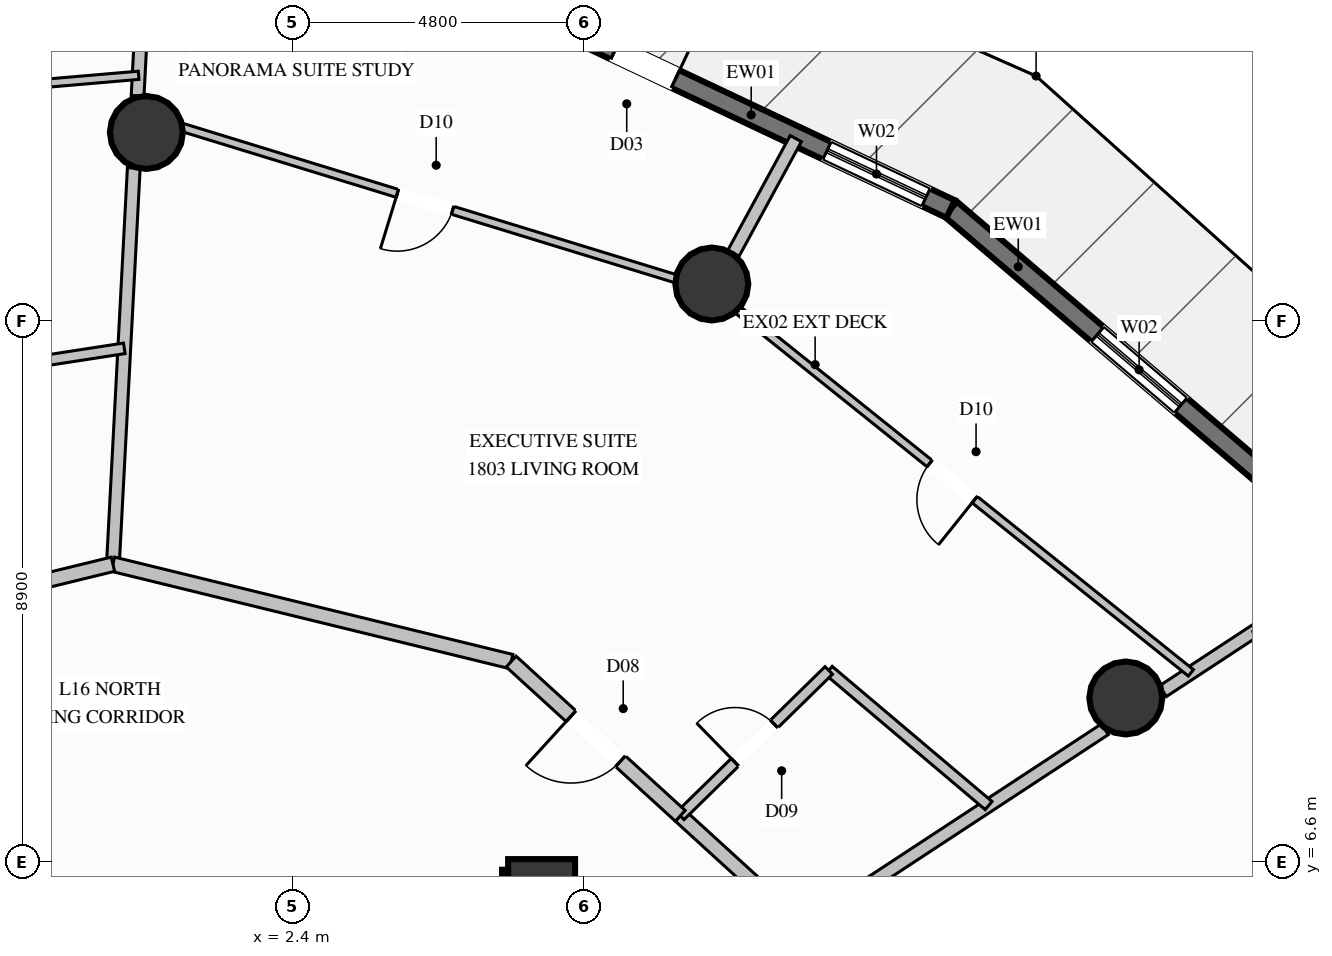
"""IFC4 building model, lengths in metres.
Left out: names, types, materials, properties, quantities, classifications, styles, units other than length and angle.
Written with IfcOpenShell. Run it as: python <this file> out.ifc"""

import sys

from ifc_helpers import new_model, si_unit, direction, frame, frame_2d, origin, origin_2d, place, context, subcontext, project, spatial, rectangle, circle, extrude, element, fill, save


model = new_model("IFC4")
c1 = context("Model", 3, precision=1e-05, world=origin(), true_north=direction((0.0, 1.0)))
c2 = subcontext(c1, "Body", "Model", "MODEL_VIEW")
j1 = project(units=[si_unit("LENGTHUNIT", "METRE"), si_unit("PLANEANGLEUNIT", "RADIAN")], contexts=[c1])
p1 = place(None, origin())
s1 = spatial("IfcSite", under=j1, at=p1, CompositionType="ELEMENT")
p2 = place(p1, origin())
s2 = spatial("IfcBuilding", under=s1, at=p2, CompositionType="ELEMENT")
p3 = place(p2, frame((0.0, 0.0, 68.0)))
s3 = spatial("IfcBuildingStorey", under=s2, at=p3, CompositionType="ELEMENT", Elevation=68.0)
p4 = place(p3, frame((6.5, 6.1, 0.0), z_axis=(0.0, 0.0, 1.0), x_axis=(1.0, 0.0, 0.0)))
e1 = element("IfcColumn", 1, at=p4, inside=s3, PredefinedType="COLUMN", context=c2, shape_type="SweptSolid", body=[
    extrude(rectangle(XDim=1.1, YDim=1.1, at=origin_2d()), origin(), (0.0, 0.0, 1.0), 3.6),
])
p5 = place(p3, frame((5.85, 6.1, 0.0), z_axis=(0.0, 0.0, 1.0), x_axis=(1.0, 0.0, 0.0)))
e2 = element("IfcWall", 2, at=p5, inside=s3, PredefinedType="SHEAR", context=c2, shape_type="SweptSolid", body=[
    extrude(rectangle(XDim=0.275, YDim=0.75, at=frame_2d((0.137, 0.0))), origin(), (0.0, 0.0, 1.0), 3.6),
])
p6 = place(p3, frame((6.5, 3.35, 0.0), z_axis=(0.0, 0.0, 1.0), x_axis=(0.0, 1.0, 0.0)))
e3 = element("IfcWall", 3, at=p6, inside=s3, PredefinedType="SHEAR", context=c2, shape_type="SweptSolid", body=[
    extrude(rectangle(XDim=3.125, YDim=0.75, at=frame_2d((1.562, 0.0))), origin(), (0.0, 0.0, 1.0), 3.6),
])
for number, where, z_axis, x_axis in (
    (4, (16.108, 9.3, 0.0), (0.0, 0.0, 1.0), (1.0, 0.0, 0.0)),
    (5, (9.3, 16.108, 0.0), (0.0, 0.0, 1.0), (1.0, 0.0, 0.0)),
    (6, (0.0, 18.6, 0.0), (0.0, 0.0, 1.0), (1.0, 0.0, 0.0)),
):
    element("IfcColumn", number, at=place(p3, frame(where, z_axis=z_axis, x_axis=x_axis)), inside=s3, PredefinedType="COLUMN", context=c2, shape_type="SweptSolid", body=[
        extrude(circle(Radius=0.6, at=origin_2d()), origin(), (0.0, 0.0, 1.0), 3.6),
    ])
p7 = place(p3, frame((13.227, 17.341, 0.0), z_axis=(0.0, 0.0, 1.0), x_axis=(0.76078130933, -0.649008319958, 0.0)))
e7 = element("IfcWall", 7, at=p7, inside=s3, PredefinedType="SOLIDWALL", context=c2, shape_type="SweptSolid", body=[
    extrude(rectangle(XDim=8.149, YDim=0.32, at=frame_2d((4.075, 0.0))), origin(), (0.0, 0.0, 1.0), 3.34),
])
p8 = place(p7, frame((3.175, 0.0, 0.35)))
e8 = element("IfcOpeningElement", 8, at=p8, cuts=e7, PredefinedType="OPENING", context=c2, shape_type="SweptSolid", body=[
    extrude(rectangle(XDim=1.8, YDim=2.6, at=frame_2d((0.9, 1.3))), frame((0.0, 0.17, 0.0), z_axis=(0.0, -1.0, 0.0), x_axis=(1.0, 0.0, 0.0)), (0.0, 0.0, 1.0), 0.34),
])
p9 = place(p3, frame((5.619, 20.933, 0.0), z_axis=(0.0, 0.0, 1.0), x_axis=(0.904280701051, -0.426938419105, 0.0)))
e9 = element("IfcWall", 9, at=p9, inside=s3, PredefinedType="SOLIDWALL", context=c2, shape_type="SweptSolid", body=[
    extrude(rectangle(XDim=8.414, YDim=0.32, at=frame_2d((4.207, 0.0))), origin(), (0.0, 0.0, 1.0), 3.34),
])
p10 = place(p9, frame((6.165, 0.0, 0.35)))
e10 = element("IfcOpeningElement", 10, at=p10, cuts=e9, PredefinedType="OPENING", context=c2, shape_type="SweptSolid", body=[
    extrude(rectangle(XDim=1.8, YDim=2.6, at=frame_2d((0.9, 1.3))), frame((0.0, 0.17, 0.0), z_axis=(0.0, -1.0, 0.0), x_axis=(1.0, 0.0, 0.0)), (0.0, 0.0, 1.0), 0.34),
])
p11 = place(p9, frame((2.308, 0.0, 0.0)))
e11 = element("IfcOpeningElement", 11, at=p11, cuts=e9, PredefinedType="OPENING", context=c2, shape_type="SweptSolid", body=[
    extrude(rectangle(XDim=1.1, YDim=2.2, at=frame_2d((0.55, 1.1))), frame((0.0, 0.17, 0.0), z_axis=(0.0, -1.0, 0.0), x_axis=(1.0, 0.0, 0.0)), (0.0, 0.0, 1.0), 0.34),
])
p12 = place(p3, frame((10.795, 5.525, 0.0), z_axis=(0.0, 0.0, 1.0), x_axis=(0.836067345727, 0.548626825273, 0.0)))
e12 = element("IfcWall", 12, at=p12, inside=s3, PredefinedType="PARTITIONING", context=c2, shape_type="SweptSolid", body=[
    extrude(rectangle(XDim=5.942, YDim=0.21, at=frame_2d((2.971, 0.0))), origin(), (0.0, 0.0, 1.0), 2.709),
])
p13 = place(p3, frame((16.718, 9.411, 0.0), z_axis=(0.0, 0.0, 1.0), x_axis=(0.836061262726, 0.548636095212, 0.0)))
e13 = element("IfcWall", 13, at=p13, inside=s3, PredefinedType="PARTITIONING", context=c2, shape_type="SweptSolid", body=[
    extrude(rectangle(XDim=3.669, YDim=0.21, at=frame_2d((1.835, 0.0))), origin(), (0.0, 0.0, 1.0), 3.34),
])
p14 = place(p3, frame((-0.55, 11.5, 0.0), z_axis=(0.0, 0.0, 1.0), x_axis=(0.052578474705, 0.998616795371, 0.0)))
e14 = element("IfcWall", 14, at=p14, inside=s3, PredefinedType="PARTITIONING", context=c2, shape_type="SweptSolid", body=[
    extrude(rectangle(XDim=6.524, YDim=0.21, at=frame_2d((3.262, 0.0))), origin(), (0.0, 0.0, 1.0), 3.34),
])
p15 = place(p3, frame((-0.144, 19.203, 0.0), z_axis=(0.0, 0.0, 1.0), x_axis=(0.052535465428, 0.998619058937, 0.0)))
e15 = element("IfcWall", 15, at=p15, inside=s3, PredefinedType="PARTITIONING", context=c2, shape_type="SweptSolid", body=[
    extrude(rectangle(XDim=2.742, YDim=0.21, at=frame_2d((1.371, 0.0))), origin(), (0.0, 0.0, 1.0), 3.34),
])
p16 = place(p3, frame((10.795, 5.525, 0.0), z_axis=(0.0, 0.0, 1.0), x_axis=(-0.738784017848, 0.673942263827, 0.0)))
e16 = element("IfcWall", 16, at=p16, inside=s3, PredefinedType="PARTITIONING", context=c2, shape_type="SweptSolid", body=[
    extrude(rectangle(XDim=2.726, YDim=0.24, at=frame_2d((1.363, 0.0))), origin(), (0.0, 0.0, 1.0), 3.34),
])
p17 = place(p3, frame((13.852, 7.531, 0.0), z_axis=(0.0, 0.0, 1.0), x_axis=(-0.76377891562, 0.645477937697, 0.0)))
e17 = element("IfcWall", 17, at=p17, inside=s3, PredefinedType="PLUMBINGWALL", context=c2, shape_type="SweptSolid", body=[
    extrude(rectangle(XDim=3.442, YDim=0.175, at=frame_2d((1.721, 0.0))), origin(), (0.0, 0.0, 1.0), 3.34),
])
p18 = place(p3, frame((8.781, 7.362, 0.0), z_axis=(0.0, 0.0, 1.0), x_axis=(0.714532745867, 0.699601997628, 0.0)))
e18 = element("IfcWall", 18, at=p18, inside=s3, PredefinedType="PLUMBINGWALL", context=c2, shape_type="SweptSolid", body=[
    extrude(rectangle(XDim=3.417, YDim=0.175, at=frame_2d((1.709, 0.0))), origin(), (0.0, 0.0, 1.0), 2.709),
])
p19 = place(p18, frame((1.259, 0.0, 0.0)))
e19 = element("IfcOpeningElement", 19, at=p19, cuts=e18, PredefinedType="OPENING", context=c2, shape_type="SweptSolid", body=[
    extrude(rectangle(XDim=0.9, YDim=2.1, at=frame_2d((0.45, 1.05))), frame((0.0, 0.098, 0.0), z_axis=(0.0, -1.0, 0.0), x_axis=(1.0, 0.0, 0.0)), (0.0, 0.0, 1.0), 0.195),
])
p20 = place(p3, frame((9.656, 16.615, 0.0), z_axis=(0.0, 0.0, 1.0), x_axis=(0.477862874023, 0.878434444697, 0.0)))
e20 = element("IfcWall", 20, at=p20, inside=s3, PredefinedType="PARTITIONING", context=c2, shape_type="SweptSolid", body=[
    extrude(rectangle(XDim=2.145, YDim=0.21, at=frame_2d((1.072, 0.0))), origin(), (0.0, 0.0, 1.0), 3.34),
])
p21 = place(p3, frame((6.0, 9.899, 0.0), z_axis=(0.0, 0.0, 1.0), x_axis=(-0.971400676792, 0.237446257348, 0.0)))
e21 = element("IfcWall", 21, at=p21, inside=s3, PredefinedType="PARTITIONING", context=c2, shape_type="SweptSolid", body=[
    extrude(rectangle(XDim=6.743, YDim=0.24, at=frame_2d((3.372, 0.0))), origin(), (0.0, 0.0, 1.0), 3.34),
])
p22 = place(p3, frame((8.781, 7.362, 0.0), z_axis=(0.0, 0.0, 1.0), x_axis=(-0.738791518375, 0.673934041562, 0.0)))
e22 = element("IfcWall", 22, at=p22, inside=s3, PredefinedType="PARTITIONING", context=c2, shape_type="SweptSolid", body=[
    extrude(rectangle(XDim=3.764, YDim=0.24, at=frame_2d((1.882, 0.0))), origin(), (0.0, 0.0, 1.0), 3.34),
])
p23 = place(p22, frame((1.332, 0.0, 0.0)))
e23 = element("IfcOpeningElement", 23, at=p23, cuts=e22, PredefinedType="OPENING", context=c2, shape_type="SweptSolid", body=[
    extrude(rectangle(XDim=1.1, YDim=2.3, at=frame_2d((0.55, 1.15))), frame((0.0, 0.13, 0.0), z_axis=(0.0, -1.0, 0.0), x_axis=(1.0, 0.0, 0.0)), (0.0, 0.0, 1.0), 0.26),
])
p24 = place(p3, frame((17.179, 9.713, 0.0), z_axis=(0.0, 0.0, 1.0), x_axis=(-0.780480528916, 0.625180089241, 0.0)))
e24 = element("IfcWall", 24, at=p24, inside=s3, PredefinedType="PARTITIONING", context=c2, shape_type="SweptSolid", body=[
    extrude(rectangle(XDim=10.064, YDim=0.135, at=frame_2d((5.032, 0.0))), origin(), (0.0, 0.0, 1.0), 2.793),
])
p25 = place(p24, frame((4.557, 0.0, 0.0)))
e25 = element("IfcOpeningElement", 25, at=p25, cuts=e24, PredefinedType="OPENING", context=c2, shape_type="SweptSolid", body=[
    extrude(rectangle(XDim=0.95, YDim=2.1, at=frame_2d((0.475, 1.05))), frame((0.0, 0.078, 0.0), z_axis=(0.0, -1.0, 0.0), x_axis=(1.0, 0.0, 0.0)), (0.0, 0.0, 1.0), 0.155),
])
p26 = place(p3, frame((9.324, 16.005, 0.0), z_axis=(0.0, 0.0, 1.0), x_axis=(-0.956059543069, 0.29317256029, 0.0)))
e26 = element("IfcWall", 26, at=p26, inside=s3, PredefinedType="PARTITIONING", context=c2, shape_type="SweptSolid", body=[
    extrude(rectangle(XDim=9.92, YDim=0.135, at=frame_2d((4.96, 0.0))), origin(), (0.0, 0.0, 1.0), 2.793),
])
p27 = place(p26, frame((4.485, 0.0, 0.0)))
e27 = element("IfcOpeningElement", 27, at=p27, cuts=e26, PredefinedType="OPENING", context=c2, shape_type="SweptSolid", body=[
    extrude(rectangle(XDim=0.95, YDim=2.1, at=frame_2d((0.475, 1.05))), frame((0.0, 0.078, 0.0), z_axis=(0.0, -1.0, 0.0), x_axis=(1.0, 0.0, 0.0)), (0.0, 0.0, 1.0), 0.155),
])
p28 = place(p3, frame((-0.55, 11.5, 0.0), z_axis=(0.0, 0.0, 1.0), x_axis=(-0.971426839663, -0.237339198579, 0.0)))
e28 = element("IfcWall", 28, at=p28, inside=s3, PredefinedType="PARTITIONING", context=c2, shape_type="SweptSolid", body=[
    extrude(rectangle(XDim=2.832, YDim=0.24, at=frame_2d((1.416, 0.0))), origin(), (0.0, 0.0, 1.0), 3.34),
])
p29 = place(p3, frame((-0.363, 15.05, 0.0), z_axis=(0.0, 0.0, 1.0), x_axis=(-0.988339584837, -0.152265771085, 0.0)))
e29 = element("IfcWall", 29, at=p29, inside=s3, PredefinedType="PLUMBINGWALL", context=c2, shape_type="SweptSolid", body=[
    extrude(rectangle(XDim=3.606, YDim=0.175, at=frame_2d((1.803, 0.0))), origin(), (0.0, 0.0, 1.0), 3.34),
])
p30 = place(p3, frame((-0.127, 19.54, 0.0), z_axis=(0.0, 0.0, 1.0), x_axis=(-0.996354434544, -0.085310261781, 0.0)))
e30 = element("IfcWall", 30, at=p30, inside=s3, PredefinedType="PARTITIONING", context=c2, shape_type="SweptSolid", body=[
    extrude(rectangle(XDim=10.972, YDim=0.135, at=frame_2d((5.486, 0.0))), origin(), (0.0, 0.0, 1.0), 3.34),
])
p31 = place(p30, frame((5.011, 0.0, 0.0)))
e31 = element("IfcOpeningElement", 31, at=p31, cuts=e30, PredefinedType="OPENING", context=c2, shape_type="SweptSolid", body=[
    extrude(rectangle(XDim=0.95, YDim=2.1, at=frame_2d((0.475, 1.05))), frame((0.0, 0.078, 0.0), z_axis=(0.0, -1.0, 0.0), x_axis=(1.0, 0.0, 0.0)), (0.0, 0.0, 1.0), 0.155),
])
p32 = place(p8, origin())
e32 = element("IfcWindow", 32, at=p32, inside=s3, PartitioningType="SINGLE_PANEL", PredefinedType="WINDOW", context=c2, shape_type="SweptSolid", body=[
    extrude(rectangle(XDim=1.8, YDim=2.6, at=frame_2d((0.9, 1.3))), frame((0.0, 0.03, 0.0), z_axis=(0.0, -1.0, 0.0), x_axis=(1.0, 0.0, 0.0)), (0.0, 0.0, 1.0), 0.06),
])
fill(e8, e32)
p33 = place(p10, origin())
e33 = element("IfcWindow", 33, at=p33, inside=s3, PartitioningType="SINGLE_PANEL", PredefinedType="WINDOW", context=c2, shape_type="SweptSolid", body=[
    extrude(rectangle(XDim=1.8, YDim=2.6, at=frame_2d((0.9, 1.3))), frame((0.0, 0.03, 0.0), z_axis=(0.0, -1.0, 0.0), x_axis=(1.0, 0.0, 0.0)), (0.0, 0.0, 1.0), 0.06),
])
fill(e10, e33)
p34 = place(p11, origin())
e34 = element("IfcDoor", 34, at=p34, inside=s3, OperationType="SINGLE_SWING_RIGHT", PredefinedType="DOOR", context=c2, shape_type="SweptSolid", body=[
    extrude(rectangle(XDim=1.1, YDim=2.2, at=frame_2d((0.55, 1.1))), frame((0.0, 0.025, 0.0), z_axis=(0.0, -1.0, 0.0), x_axis=(1.0, 0.0, 0.0)), (0.0, 0.0, 1.0), 0.05),
])
fill(e11, e34)
p35 = place(p19, origin())
e35 = element("IfcDoor", 35, at=p35, inside=s3, OperationType="SINGLE_SWING_LEFT", PredefinedType="DOOR", context=c2, shape_type="SweptSolid", body=[
    extrude(rectangle(XDim=0.9, YDim=2.1, at=frame_2d((0.45, 1.05))), frame((0.0, 0.025, 0.0), z_axis=(0.0, -1.0, 0.0), x_axis=(1.0, 0.0, 0.0)), (0.0, 0.0, 1.0), 0.05),
])
fill(e19, e35)
p36 = place(p23, origin())
e36 = element("IfcDoor", 36, at=p36, inside=s3, OperationType="SINGLE_SWING_RIGHT", PredefinedType="DOOR", context=c2, shape_type="SweptSolid", body=[
    extrude(rectangle(XDim=1.1, YDim=2.3, at=frame_2d((0.55, 1.15))), frame((0.0, 0.025, 0.0), z_axis=(0.0, -1.0, 0.0), x_axis=(1.0, 0.0, 0.0)), (0.0, 0.0, 1.0), 0.05),
])
fill(e23, e36)
p37 = place(p25, origin())
e37 = element("IfcDoor", 37, at=p37, inside=s3, OperationType="SINGLE_SWING_LEFT", PredefinedType="DOOR", context=c2, shape_type="SweptSolid", body=[
    extrude(rectangle(XDim=0.95, YDim=2.1, at=frame_2d((0.475, 1.05))), frame((0.0, 0.025, 0.0), z_axis=(0.0, -1.0, 0.0), x_axis=(1.0, 0.0, 0.0)), (0.0, 0.0, 1.0), 0.05),
])
fill(e25, e37)
p38 = place(p27, origin())
e38 = element("IfcDoor", 38, at=p38, inside=s3, OperationType="SINGLE_SWING_RIGHT", PredefinedType="DOOR", context=c2, shape_type="SweptSolid", body=[
    extrude(rectangle(XDim=0.95, YDim=2.1, at=frame_2d((0.475, 1.05))), frame((0.0, 0.025, 0.0), z_axis=(0.0, -1.0, 0.0), x_axis=(1.0, 0.0, 0.0)), (0.0, 0.0, 1.0), 0.05),
])
fill(e27, e38)
save(model, sys.argv[1])
